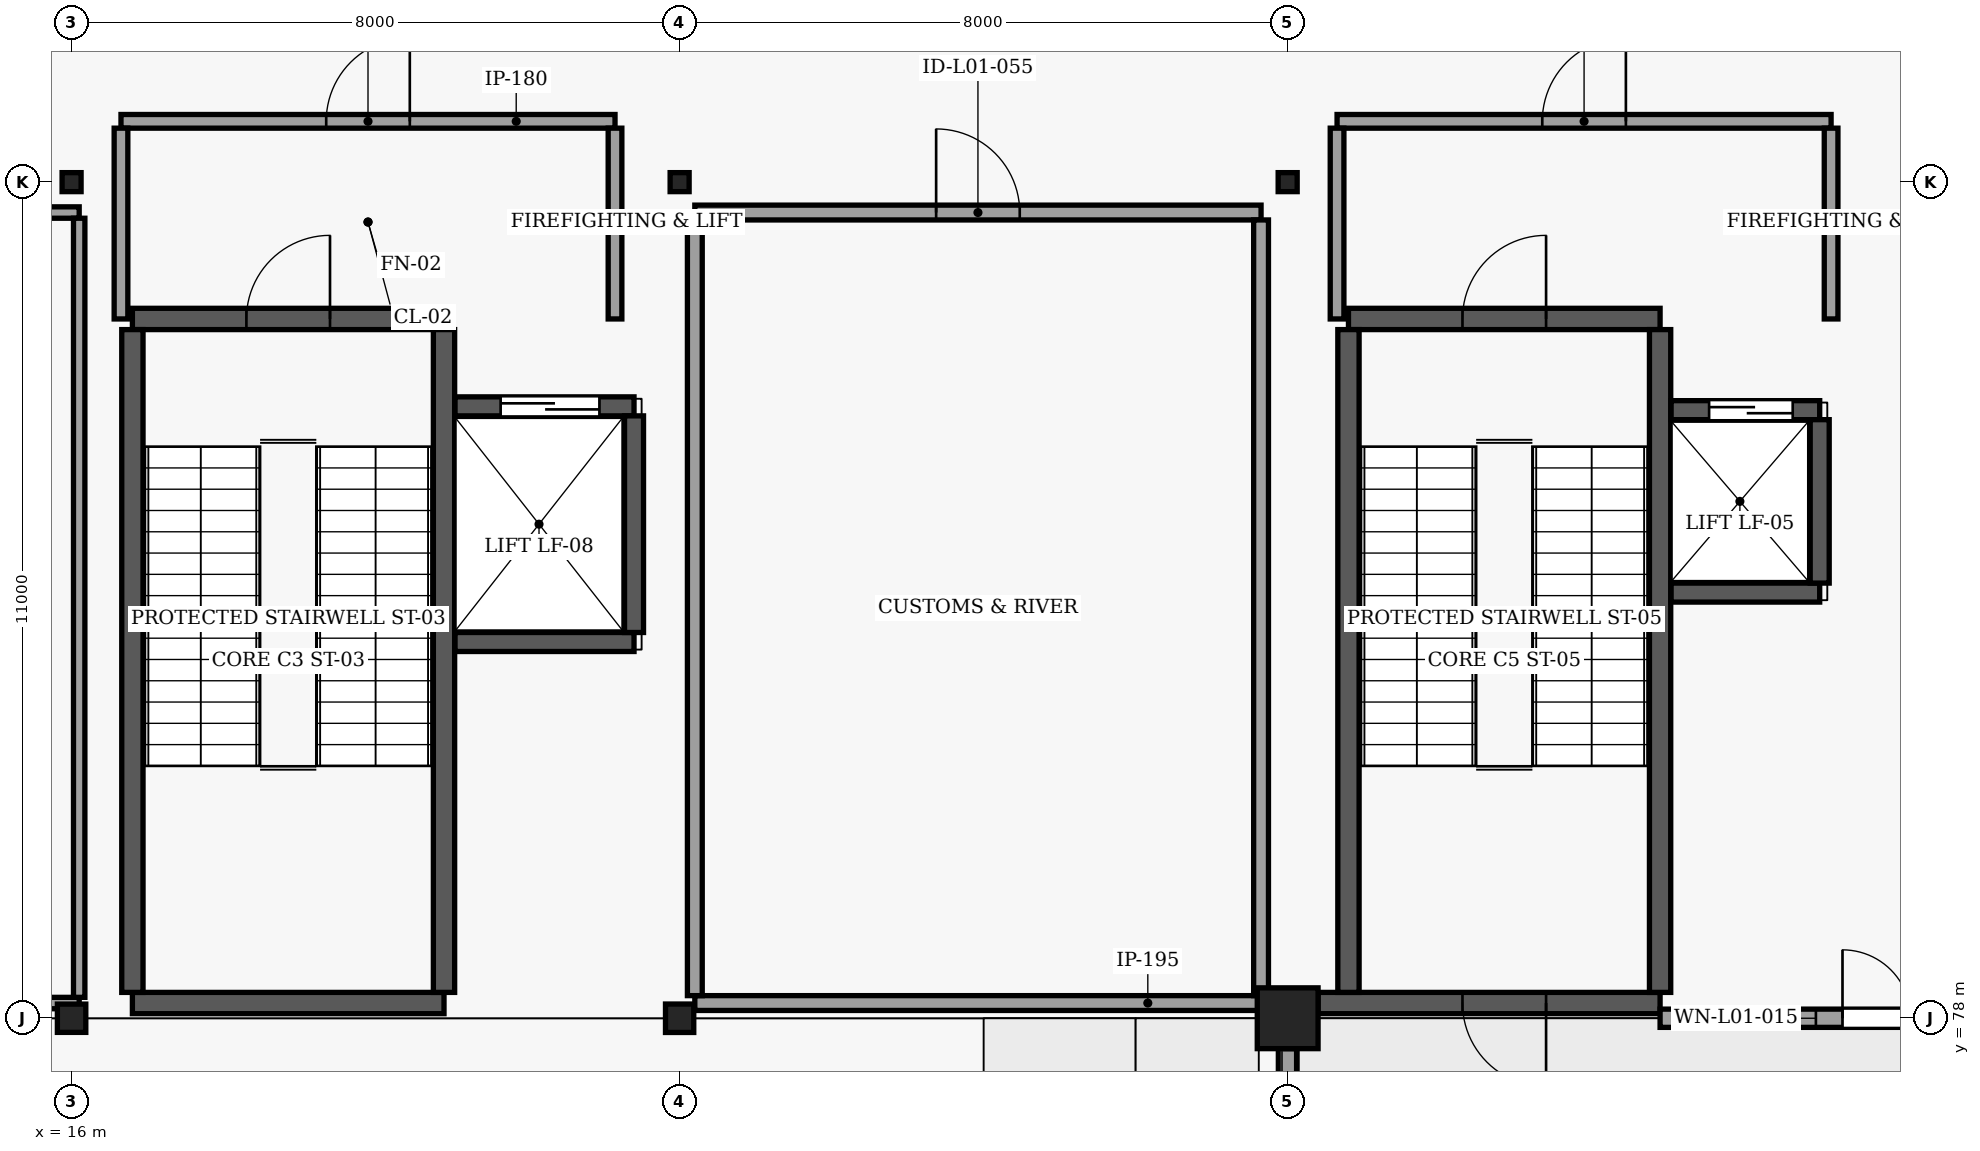
"""IFC4 building model, lengths in metres.
Left out: names, types, materials, properties, quantities, classifications, styles, units other than length and angle.
Written with IfcOpenShell. Run it as: python <this file> out.ifc"""

import sys

from ifc_helpers import new_model, si_unit, direction, frame, frame_2d, origin, origin_2d, place, context, subcontext, project, spatial, rectangle, hollow_rectangle, i_section, extrude, element, fill, save


model = new_model("IFC4")
c1 = context("Model", 3, precision=1e-05, world=origin(), true_north=direction((0.0, 1.0)))
c2 = subcontext(c1, "Body", "Model", "MODEL_VIEW")
j1 = project(units=[si_unit("LENGTHUNIT", "METRE"), si_unit("PLANEANGLEUNIT", "RADIAN")], contexts=[c1])
p1 = place(None, origin())
s1 = spatial("IfcSite", under=j1, at=p1, CompositionType="ELEMENT")
p2 = place(p1, origin())
s2 = spatial("IfcBuilding", under=s1, at=p2, CompositionType="ELEMENT")
p3 = place(p2, origin())
s3 = spatial("IfcBuildingStorey", under=s2, at=p3, CompositionType="ELEMENT", Elevation=0.0)
for number, where, z_axis, x_axis in (
    (1, (16.0, 78.0, -0.45), (0.0, 0.0, 1.0), (1.0, 0.0, 0.0)),
    (2, (24.0, 78.0, -0.45), (0.0, 0.0, 1.0), (0.0, 1.0, 0.0)),
):
    element("IfcColumn", number, at=place(p3, frame(where, z_axis=z_axis, x_axis=x_axis)), inside=s3, PredefinedType="COLUMN", context=c2, shape_type="SweptSolid", body=[
        extrude(i_section(OverallWidth=0.374, OverallDepth=0.372, WebThickness=0.016, FlangeThickness=0.026, FilletRadius=0.016, at=origin_2d()), origin(), (0.0, 0.0, 1.0), 5.57),
    ])
p4 = place(p3, frame((32.0, 78.0, -0.45), z_axis=(0.0, 0.0, 1.0), x_axis=(1.0, 0.0, 0.0)))
e3 = element("IfcColumn", 3, at=p4, inside=s3, PredefinedType="COLUMN", context=c2, shape_type="SweptSolid", body=[
    extrude(rectangle(XDim=0.8, YDim=0.8, at=origin_2d()), origin(), (0.0, 0.0, 1.0), 5.57),
])
for number, where, z_axis, x_axis in (
    (4, (16.0, 89.0, -0.45), (0.0, 0.0, 1.0), (1.0, 0.0, 0.0)),
    (5, (24.0, 89.0, -0.45), (0.0, 0.0, 1.0), (1.0, 0.0, 0.0)),
    (6, (32.0, 89.0, -0.45), (0.0, 0.0, 1.0), (1.0, 0.0, 0.0)),
):
    element("IfcColumn", number, at=place(p3, frame(where, z_axis=z_axis, x_axis=x_axis)), inside=s3, PredefinedType="COLUMN", context=c2, shape_type="SweptSolid", body=[
        extrude(hollow_rectangle(XDim=0.25, YDim=0.25, WallThickness=0.012, InnerFilletRadius=0.012, OuterFilletRadius=0.025, at=origin_2d()), origin(), (0.0, 0.0, 1.0), 5.57),
    ])
p5 = place(p3, frame((16.8, 78.2, -0.45), z_axis=(0.0, 0.0, 1.0), x_axis=(1.0, 0.0, 0.0)))
e7 = element("IfcWall", 7, at=p5, inside=s3, PredefinedType="SHEAR", context=c2, shape_type="SweptSolid", body=[
    extrude(rectangle(XDim=4.1, YDim=0.28, at=frame_2d((2.05, 0.0))), origin(), (0.0, 0.0, 1.0), 5.57),
])
p6 = place(p3, frame((16.8, 87.2, -0.45), z_axis=(0.0, 0.0, 1.0), x_axis=(1.0, 0.0, 0.0)))
e8 = element("IfcWall", 8, at=p6, inside=s3, PredefinedType="SHEAR", context=c2, shape_type="SweptSolid", body=[
    extrude(rectangle(XDim=4.1, YDim=0.28, at=frame_2d((2.05, 0.0))), origin(), (0.0, 0.0, 1.0), 5.57),
])
p7 = place(p6, frame((1.5, 0.0, 0.45)))
e9 = element("IfcOpeningElement", 9, at=p7, cuts=e8, PredefinedType="OPENING", context=c2, shape_type="SweptSolid", body=[
    extrude(rectangle(XDim=1.1, YDim=2.2, at=frame_2d((0.55, 1.1))), frame((0.0, 0.15, 0.0), z_axis=(0.0, -1.0, 0.0), x_axis=(1.0, 0.0, 0.0)), (0.0, 0.0, 1.0), 0.3),
])
for number, where, z_axis, x_axis in (
    (10, (16.8, 78.34, -0.45), (0.0, 0.0, 1.0), (0.0, 1.0, 0.0)),
    (11, (20.9, 78.34, -0.45), (0.0, 0.0, 1.0), (0.0, 1.0, 0.0)),
):
    element("IfcWall", number, at=place(p3, frame(where, z_axis=z_axis, x_axis=x_axis)), inside=s3, PredefinedType="SHEAR", context=c2, shape_type="SweptSolid", body=[
        extrude(rectangle(XDim=8.72, YDim=0.28, at=frame_2d((4.36, 0.0))), origin(), (0.0, 0.0, 1.0), 5.57),
    ])
p8 = place(p3, frame((21.045, 82.95, -1.6), z_axis=(0.0, 0.0, 1.0), x_axis=(1.0, 0.0, 0.0)))
e12 = element("IfcWall", 12, at=p8, inside=s3, PredefinedType="SOLIDWALL", context=c2, shape_type="SweptSolid", body=[
    extrude(rectangle(XDim=2.355, YDim=0.25, at=frame_2d((1.177, 0.0))), origin(), (0.0, 0.0, 1.0), 6.72),
])
p9 = place(p3, frame((21.045, 86.05, -1.6), z_axis=(0.0, 0.0, 1.0), x_axis=(1.0, 0.0, 0.0)))
e13 = element("IfcWall", 13, at=p9, inside=s3, PredefinedType="SOLIDWALL", context=c2, shape_type="SweptSolid", body=[
    extrude(rectangle(XDim=2.355, YDim=0.25, at=frame_2d((1.177, 0.0))), origin(), (0.0, 0.0, 1.0), 6.72),
])
p10 = place(p9, frame((0.6, 0.0, 1.6)))
e14 = element("IfcOpeningElement", 14, at=p10, cuts=e13, PredefinedType="OPENING", context=c2, shape_type="SweptSolid", body=[
    extrude(rectangle(XDim=1.3, YDim=2.2, at=frame_2d((0.65, 1.1))), frame((0.0, 0.135, 0.0), z_axis=(0.0, -1.0, 0.0), x_axis=(1.0, 0.0, 0.0)), (0.0, 0.0, 1.0), 0.27),
])
p11 = place(p3, frame((23.4, 83.075, -1.6), z_axis=(0.0, 0.0, 1.0), x_axis=(0.0, 1.0, 0.0)))
e15 = element("IfcWall", 15, at=p11, inside=s3, PredefinedType="SOLIDWALL", context=c2, shape_type="SweptSolid", body=[
    extrude(rectangle(XDim=2.85, YDim=0.25, at=frame_2d((1.425, 0.0))), origin(), (0.0, 0.0, 1.0), 6.72),
])
p12 = place(p3, frame((36.9, 78.2, -0.45), z_axis=(0.0, 0.0, 1.0), x_axis=(-1.0, 0.0, 0.0)))
e16 = element("IfcWall", 16, at=p12, inside=s3, PredefinedType="SHEAR", context=c2, shape_type="SweptSolid", body=[
    extrude(rectangle(XDim=4.5, YDim=0.28, at=frame_2d((2.25, 0.0))), origin(), (0.0, 0.0, 1.0), 5.57),
])
p13 = place(p12, frame((1.5, 0.0, 0.45)))
e17 = element("IfcOpeningElement", 17, at=p13, cuts=e16, PredefinedType="OPENING", context=c2, shape_type="SweptSolid", body=[
    extrude(rectangle(XDim=1.1, YDim=2.2, at=frame_2d((0.55, 1.1))), frame((0.0, 0.15, 0.0), z_axis=(0.0, -1.0, 0.0), x_axis=(1.0, 0.0, 0.0)), (0.0, 0.0, 1.0), 0.3),
])
p14 = place(p3, frame((32.8, 87.2, -0.45), z_axis=(0.0, 0.0, 1.0), x_axis=(1.0, 0.0, 0.0)))
e18 = element("IfcWall", 18, at=p14, inside=s3, PredefinedType="SHEAR", context=c2, shape_type="SweptSolid", body=[
    extrude(rectangle(XDim=4.1, YDim=0.28, at=frame_2d((2.05, 0.0))), origin(), (0.0, 0.0, 1.0), 5.57),
])
p15 = place(p14, frame((1.5, 0.0, 0.45)))
e19 = element("IfcOpeningElement", 19, at=p15, cuts=e18, PredefinedType="OPENING", context=c2, shape_type="SweptSolid", body=[
    extrude(rectangle(XDim=1.1, YDim=2.2, at=frame_2d((0.55, 1.1))), frame((0.0, 0.15, 0.0), z_axis=(0.0, -1.0, 0.0), x_axis=(1.0, 0.0, 0.0)), (0.0, 0.0, 1.0), 0.3),
])
for number, where, z_axis, x_axis in (
    (20, (32.8, 78.34, -0.45), (0.0, 0.0, 1.0), (0.0, 1.0, 0.0)),
    (21, (36.9, 78.34, -0.45), (0.0, 0.0, 1.0), (0.0, 1.0, 0.0)),
):
    element("IfcWall", number, at=place(p3, frame(where, z_axis=z_axis, x_axis=x_axis)), inside=s3, PredefinedType="SHEAR", context=c2, shape_type="SweptSolid", body=[
        extrude(rectangle(XDim=8.72, YDim=0.28, at=frame_2d((4.36, 0.0))), origin(), (0.0, 0.0, 1.0), 5.57),
    ])
p16 = place(p3, frame((37.045, 83.6, -1.6), z_axis=(0.0, 0.0, 1.0), x_axis=(1.0, 0.0, 0.0)))
e22 = element("IfcWall", 22, at=p16, inside=s3, PredefinedType="SOLIDWALL", context=c2, shape_type="SweptSolid", body=[
    extrude(rectangle(XDim=1.955, YDim=0.25, at=frame_2d((0.978, 0.0))), origin(), (0.0, 0.0, 1.0), 6.72),
])
p17 = place(p3, frame((37.045, 86.0, -1.6), z_axis=(0.0, 0.0, 1.0), x_axis=(1.0, 0.0, 0.0)))
e23 = element("IfcWall", 23, at=p17, inside=s3, PredefinedType="SOLIDWALL", context=c2, shape_type="SweptSolid", body=[
    extrude(rectangle(XDim=1.955, YDim=0.25, at=frame_2d((0.978, 0.0))), origin(), (0.0, 0.0, 1.0), 6.72),
])
p18 = place(p17, frame((0.5, 0.0, 1.6)))
e24 = element("IfcOpeningElement", 24, at=p18, cuts=e23, PredefinedType="OPENING", context=c2, shape_type="SweptSolid", body=[
    extrude(rectangle(XDim=1.1, YDim=2.2, at=frame_2d((0.55, 1.1))), frame((0.0, 0.135, 0.0), z_axis=(0.0, -1.0, 0.0), x_axis=(1.0, 0.0, 0.0)), (0.0, 0.0, 1.0), 0.27),
])
p19 = place(p3, frame((39.0, 83.725, -1.6), z_axis=(0.0, 0.0, 1.0), x_axis=(0.0, 1.0, 0.0)))
e25 = element("IfcWall", 25, at=p19, inside=s3, PredefinedType="SOLIDWALL", context=c2, shape_type="SweptSolid", body=[
    extrude(rectangle(XDim=2.15, YDim=0.25, at=frame_2d((1.075, 0.0))), origin(), (0.0, 0.0, 1.0), 6.72),
])
p20 = place(p3, frame((32.0, 66.4, 1.88), z_axis=(0.0, 0.0, 1.0), x_axis=(0.0, 1.0, 0.0)))
e26 = element("IfcWall", 26, at=p20, inside=s3, PredefinedType="SOLIDWALL", context=c2, shape_type="SweptSolid", body=[
    extrude(rectangle(XDim=11.2, YDim=0.245, at=frame_2d((5.6, 0.0))), origin(), (0.0, 0.0, 1.0), 0.22),
])
p21 = place(p3, frame((32.0, 76.15, 1.38), z_axis=(0.0, 0.0, 1.0), x_axis=(0.0, 1.0, 0.0)))
e27 = element("IfcWall", 27, at=p21, inside=s3, PredefinedType="SOLIDWALL", context=c2, shape_type="SweptSolid", body=[
    extrude(rectangle(XDim=1.45, YDim=0.235, at=frame_2d((0.725, 0.0))), origin(), (0.0, 0.0, 1.0), 0.5),
])
p22 = place(p3, frame((36.9, 78.0, 0.0), z_axis=(0.0, 0.0, 1.0), x_axis=(1.0, 0.0, 0.0)))
e28 = element("IfcWall", 28, at=p22, inside=s3, PredefinedType="ELEMENTEDWALL", context=c2, shape_type="SweptSolid", body=[
    extrude(rectangle(XDim=4.75, YDim=0.24, at=frame_2d((2.375, 0.0))), origin(), (0.0, 0.0, 1.0), 4.658),
])
p23 = place(p22, frame((2.4, 0.0, 0.0)))
e29 = element("IfcOpeningElement", 29, at=p23, cuts=e28, PredefinedType="OPENING", context=c2, shape_type="SweptSolid", body=[
    extrude(rectangle(XDim=1.8, YDim=2.25, at=frame_2d((0.9, 1.125))), frame((0.0, 0.13, 0.0), z_axis=(0.0, -1.0, 0.0), x_axis=(1.0, 0.0, 0.0)), (0.0, 0.0, 1.0), 0.26),
])
p24 = place(p22, frame((0.55, 0.0, 0.95)))
e30 = element("IfcOpeningElement", 30, at=p24, cuts=e28, PredefinedType="OPENING", context=c2, shape_type="SweptSolid", body=[
    extrude(rectangle(XDim=1.5, YDim=1.5, at=frame_2d((0.75, 0.75))), frame((0.0, 0.13, 0.0), z_axis=(0.0, -1.0, 0.0), x_axis=(1.0, 0.0, 0.0)), (0.0, 0.0, 1.0), 0.26),
])
p25 = place(p3, frame((16.65, 89.8, 0.0), z_axis=(0.0, 0.0, 1.0), x_axis=(1.0, 0.0, 0.0)))
e31 = element("IfcWall", 31, at=p25, inside=s3, PredefinedType="SOLIDWALL", context=c2, shape_type="SweptSolid", body=[
    extrude(rectangle(XDim=6.5, YDim=0.18, at=frame_2d((3.25, 0.0))), origin(), (0.0, 0.0, 1.0), 5.1),
])
p26 = place(p25, frame((2.7, 0.0, 0.0)))
e32 = element("IfcOpeningElement", 32, at=p26, cuts=e31, PredefinedType="OPENING", context=c2, shape_type="SweptSolid", body=[
    extrude(rectangle(XDim=1.1, YDim=2.2, at=frame_2d((0.55, 1.1))), frame((0.0, 0.1, 0.0), z_axis=(0.0, -1.0, 0.0), x_axis=(1.0, 0.0, 0.0)), (0.0, 0.0, 1.0), 0.2),
])
for number, where, z_axis, x_axis in (
    (33, (16.65, 87.2, 0.0), (0.0, 0.0, 1.0), (0.0, 1.0, 0.0)),
    (34, (23.15, 87.2, 0.0), (0.0, 0.0, 1.0), (0.0, 1.0, 0.0)),
):
    element("IfcWall", number, at=place(p3, frame(where, z_axis=z_axis, x_axis=x_axis)), inside=s3, PredefinedType="SOLIDWALL", context=c2, shape_type="SweptSolid", body=[
        extrude(rectangle(XDim=2.51, YDim=0.18, at=frame_2d((1.255, 0.0))), origin(), (0.0, 0.0, 1.0), 4.66),
    ])
p27 = place(p3, frame((32.65, 89.8, 0.0), z_axis=(0.0, 0.0, 1.0), x_axis=(1.0, 0.0, 0.0)))
e35 = element("IfcWall", 35, at=p27, inside=s3, PredefinedType="SOLIDWALL", context=c2, shape_type="SweptSolid", body=[
    extrude(rectangle(XDim=6.5, YDim=0.18, at=frame_2d((3.25, 0.0))), origin(), (0.0, 0.0, 1.0), 5.1),
])
p28 = place(p27, frame((2.7, 0.0, 0.0)))
e36 = element("IfcOpeningElement", 36, at=p28, cuts=e35, PredefinedType="OPENING", context=c2, shape_type="SweptSolid", body=[
    extrude(rectangle(XDim=1.1, YDim=2.2, at=frame_2d((0.55, 1.1))), frame((0.0, 0.1, 0.0), z_axis=(0.0, -1.0, 0.0), x_axis=(1.0, 0.0, 0.0)), (0.0, 0.0, 1.0), 0.2),
])
for number, where, z_axis, x_axis in (
    (37, (32.65, 87.2, 0.0), (0.0, 0.0, 1.0), (0.0, 1.0, 0.0)),
    (38, (39.15, 87.2, 0.0), (0.0, 0.0, 1.0), (0.0, 1.0, 0.0)),
):
    element("IfcWall", number, at=place(p3, frame(where, z_axis=z_axis, x_axis=x_axis)), inside=s3, PredefinedType="SOLIDWALL", context=c2, shape_type="SweptSolid", body=[
        extrude(rectangle(XDim=2.51, YDim=0.18, at=frame_2d((1.255, 0.0))), origin(), (0.0, 0.0, 1.0), 4.66),
    ])
p29 = place(p3, frame((8.08, 78.2, 0.0), z_axis=(0.0, 0.0, 1.0), x_axis=(1.0, 0.0, 0.0)))
e39 = element("IfcWall", 39, at=p29, inside=s3, PredefinedType="PARTITIONING", context=c2, shape_type="SweptSolid", body=[
    extrude(rectangle(XDim=8.02, YDim=0.15, at=frame_2d((4.01, 0.0))), origin(), (0.0, 0.0, 1.0), 3.415),
])
p30 = place(p3, frame((8.08, 88.6, 0.0), z_axis=(0.0, 0.0, 1.0), x_axis=(1.0, 0.0, 0.0)))
e40 = element("IfcWall", 40, at=p30, inside=s3, PredefinedType="PARTITIONING", context=c2, shape_type="SweptSolid", body=[
    extrude(rectangle(XDim=8.02, YDim=0.15, at=frame_2d((4.01, 0.0))), origin(), (0.0, 0.0, 1.0), 4.696),
])
p31 = place(p30, frame((2.91, 0.0, 0.0)))
e41 = element("IfcOpeningElement", 41, at=p31, cuts=e40, PredefinedType="OPENING", context=c2, shape_type="SweptSolid", body=[
    extrude(rectangle(XDim=2.2, YDim=2.45, at=frame_2d((1.1, 1.225))), frame((0.0, 0.085, 0.0), z_axis=(0.0, -1.0, 0.0), x_axis=(1.0, 0.0, 0.0)), (0.0, 0.0, 1.0), 0.17),
])
p32 = place(p3, frame((16.1, 78.275, 0.0), z_axis=(0.0, 0.0, 1.0), x_axis=(0.0, 1.0, 0.0)))
e42 = element("IfcWall", 42, at=p32, inside=s3, PredefinedType="PARTITIONING", context=c2, shape_type="SweptSolid", body=[
    extrude(rectangle(XDim=10.25, YDim=0.15, at=frame_2d((5.125, 0.0))), origin(), (0.0, 0.0, 1.0), 4.696),
])
p33 = place(p3, frame((24.2, 78.2, 0.0), z_axis=(0.0, 0.0, 1.0), x_axis=(1.0, 0.0, 0.0)))
e43 = element("IfcWall", 43, at=p33, inside=s3, PredefinedType="SOLIDWALL", context=c2, shape_type="SweptSolid", body=[
    extrude(rectangle(XDim=7.45, YDim=0.195, at=frame_2d((3.725, 0.0))), origin(), (0.0, 0.0, 1.0), 3.415),
])
p34 = place(p3, frame((24.2, 88.6, 0.0), z_axis=(0.0, 0.0, 1.0), x_axis=(1.0, 0.0, 0.0)))
e44 = element("IfcWall", 44, at=p34, inside=s3, PredefinedType="SOLIDWALL", context=c2, shape_type="SweptSolid", body=[
    extrude(rectangle(XDim=7.45, YDim=0.195, at=frame_2d((3.725, 0.0))), origin(), (0.0, 0.0, 1.0), 5.1),
])
p35 = place(p34, frame((3.175, 0.0, 0.0)))
e45 = element("IfcOpeningElement", 45, at=p35, cuts=e44, PredefinedType="OPENING", context=c2, shape_type="SweptSolid", body=[
    extrude(rectangle(XDim=1.1, YDim=2.3, at=frame_2d((0.55, 1.15))), frame((0.0, 0.107, 0.0), z_axis=(0.0, -1.0, 0.0), x_axis=(1.0, 0.0, 0.0)), (0.0, 0.0, 1.0), 0.215),
])
p36 = place(p3, frame((24.2, 78.298, 0.0), z_axis=(0.0, 0.0, 1.0), x_axis=(0.0, 1.0, 0.0)))
e46 = element("IfcWall", 46, at=p36, inside=s3, PredefinedType="SOLIDWALL", context=c2, shape_type="SweptSolid", body=[
    extrude(rectangle(XDim=10.205, YDim=0.195, at=frame_2d((5.103, 0.0))), origin(), (0.0, 0.0, 1.0), 4.703),
])
p37 = place(p3, frame((31.65, 78.298, 0.0), z_axis=(0.0, 0.0, 1.0), x_axis=(0.0, 1.0, 0.0)))
e47 = element("IfcWall", 47, at=p37, inside=s3, PredefinedType="SOLIDWALL", context=c2, shape_type="SweptSolid", body=[
    extrude(rectangle(XDim=10.205, YDim=0.195, at=frame_2d((5.103, 0.0))), origin(), (0.0, 0.0, 1.0), 4.807),
])
p38 = place(p7, origin())
e48 = element("IfcDoor", 48, at=p38, inside=s3, OperationType="SINGLE_SWING_RIGHT", PredefinedType="DOOR", context=c2, shape_type="SweptSolid", body=[
    extrude(rectangle(XDim=1.1, YDim=2.2, at=frame_2d((0.55, 1.1))), frame((0.0, 0.025, 0.0), z_axis=(0.0, -1.0, 0.0), x_axis=(1.0, 0.0, 0.0)), (0.0, 0.0, 1.0), 0.05),
])
fill(e9, e48)
p39 = place(p10, origin())
e49 = element("IfcDoor", 49, at=p39, inside=s3, OperationType="SLIDING_TO_RIGHT", PredefinedType="DOOR", context=c2, shape_type="SweptSolid", body=[
    extrude(rectangle(XDim=1.3, YDim=2.2, at=frame_2d((0.65, 1.1))), frame((0.0, 0.025, 0.0), z_axis=(0.0, -1.0, 0.0), x_axis=(1.0, 0.0, 0.0)), (0.0, 0.0, 1.0), 0.05),
])
fill(e14, e49)
p40 = place(p15, origin())
e50 = element("IfcDoor", 50, at=p40, inside=s3, OperationType="SINGLE_SWING_RIGHT", PredefinedType="DOOR", context=c2, shape_type="SweptSolid", body=[
    extrude(rectangle(XDim=1.1, YDim=2.2, at=frame_2d((0.55, 1.1))), frame((0.0, 0.025, 0.0), z_axis=(0.0, -1.0, 0.0), x_axis=(1.0, 0.0, 0.0)), (0.0, 0.0, 1.0), 0.05),
])
fill(e19, e50)
p41 = place(p13, origin())
e51 = element("IfcDoor", 51, at=p41, inside=s3, OperationType="SINGLE_SWING_LEFT", PredefinedType="DOOR", context=c2, shape_type="SweptSolid", body=[
    extrude(rectangle(XDim=1.1, YDim=2.2, at=frame_2d((0.55, 1.1))), frame((0.0, 0.025, 0.0), z_axis=(0.0, -1.0, 0.0), x_axis=(1.0, 0.0, 0.0)), (0.0, 0.0, 1.0), 0.05),
])
fill(e17, e51)
p42 = place(p18, origin())
e52 = element("IfcDoor", 52, at=p42, inside=s3, OperationType="SLIDING_TO_LEFT", PredefinedType="DOOR", context=c2, shape_type="SweptSolid", body=[
    extrude(rectangle(XDim=1.1, YDim=2.2, at=frame_2d((0.55, 1.1))), frame((0.0, 0.025, 0.0), z_axis=(0.0, -1.0, 0.0), x_axis=(1.0, 0.0, 0.0)), (0.0, 0.0, 1.0), 0.05),
])
fill(e24, e52)
p43 = place(p23, origin())
e53 = element("IfcDoor", 53, at=p43, inside=s3, OperationType="DOUBLE_DOOR_SINGLE_SWING", PredefinedType="DOOR", context=c2, shape_type="SweptSolid", body=[
    extrude(rectangle(XDim=1.8, YDim=2.25, at=frame_2d((0.9, 1.125))), frame((0.0, 0.025, 0.0), z_axis=(0.0, -1.0, 0.0), x_axis=(1.0, 0.0, 0.0)), (0.0, 0.0, 1.0), 0.05),
])
fill(e29, e53)
p44 = place(p24, origin())
e54 = element("IfcWindow", 54, at=p44, inside=s3, PartitioningType="SINGLE_PANEL", PredefinedType="WINDOW", context=c2, shape_type="SweptSolid", body=[
    extrude(rectangle(XDim=1.5, YDim=1.5, at=frame_2d((0.75, 0.75))), frame((0.0, 0.03, 0.0), z_axis=(0.0, -1.0, 0.0), x_axis=(1.0, 0.0, 0.0)), (0.0, 0.0, 1.0), 0.06),
])
fill(e30, e54)
p45 = place(p26, origin())
e55 = element("IfcDoor", 55, at=p45, inside=s3, OperationType="SINGLE_SWING_RIGHT", PredefinedType="DOOR", context=c2, shape_type="SweptSolid", body=[
    extrude(rectangle(XDim=1.1, YDim=2.2, at=frame_2d((0.55, 1.1))), frame((0.0, 0.025, 0.0), z_axis=(0.0, -1.0, 0.0), x_axis=(1.0, 0.0, 0.0)), (0.0, 0.0, 1.0), 0.05),
])
fill(e32, e55)
p46 = place(p28, origin())
e56 = element("IfcDoor", 56, at=p46, inside=s3, OperationType="SINGLE_SWING_RIGHT", PredefinedType="DOOR", context=c2, shape_type="SweptSolid", body=[
    extrude(rectangle(XDim=1.1, YDim=2.2, at=frame_2d((0.55, 1.1))), frame((0.0, 0.025, 0.0), z_axis=(0.0, -1.0, 0.0), x_axis=(1.0, 0.0, 0.0)), (0.0, 0.0, 1.0), 0.05),
])
fill(e36, e56)
p47 = place(p35, origin())
e57 = element("IfcDoor", 57, at=p47, inside=s3, OperationType="SINGLE_SWING_LEFT", PredefinedType="DOOR", context=c2, shape_type="SweptSolid", body=[
    extrude(rectangle(XDim=1.1, YDim=2.3, at=frame_2d((0.55, 1.15))), frame((0.0, 0.025, 0.0), z_axis=(0.0, -1.0, 0.0), x_axis=(1.0, 0.0, 0.0)), (0.0, 0.0, 1.0), 0.05),
])
fill(e45, e57)
save(model, sys.argv[1])
